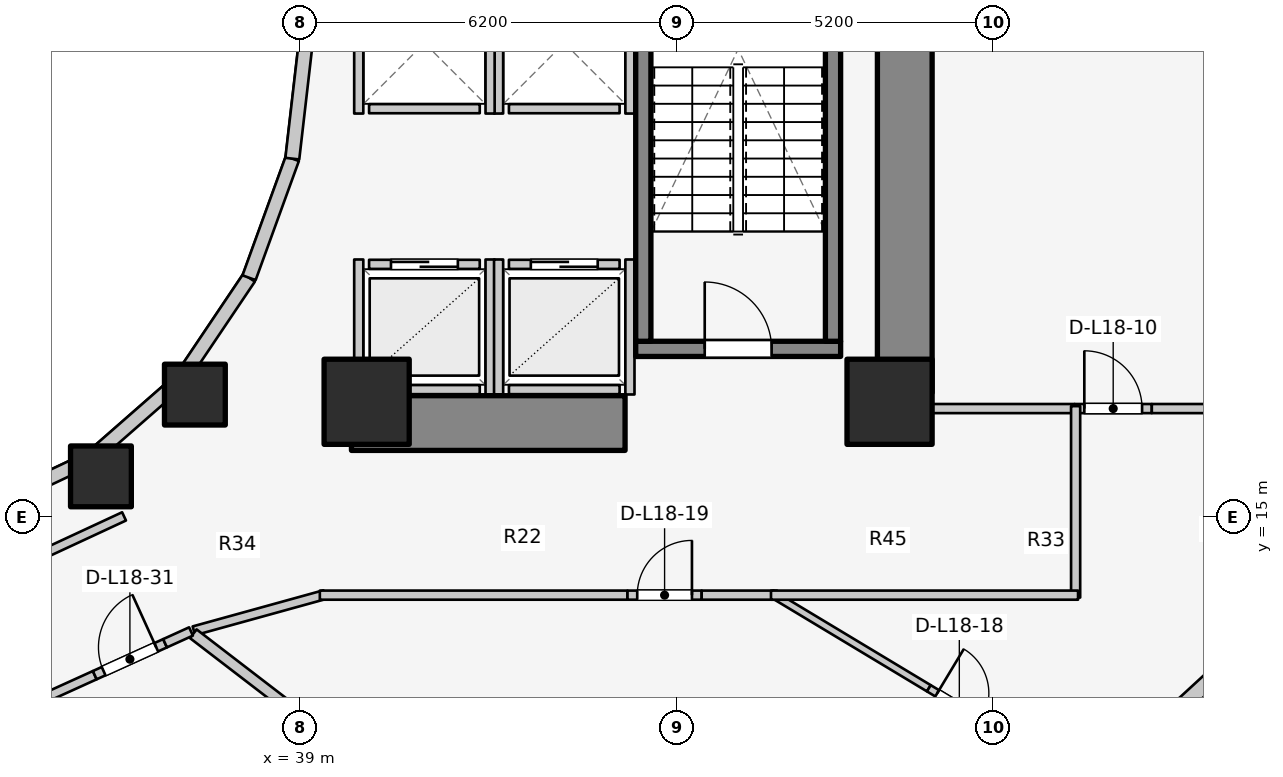
"""IFC4 building model, lengths in metres.
Left out: names, types, materials, properties, quantities, classifications, styles, units other than length and angle.
Written with IfcOpenShell. Run it as: python <this file> out.ifc"""

import sys

from ifc_helpers import new_model, si_unit, direction, frame, frame_2d, origin, origin_2d, place, context, subcontext, project, spatial, rectangle, extrude, element, fill, save


model = new_model("IFC4")
c1 = context("Model", 3, precision=1e-05, world=origin(), true_north=direction((0.0, 1.0)))
c2 = subcontext(c1, "Body", "Model", "MODEL_VIEW")
j1 = project(units=[si_unit("LENGTHUNIT", "METRE"), si_unit("PLANEANGLEUNIT", "RADIAN")], contexts=[c1])
p1 = place(None, origin())
s1 = spatial("IfcSite", under=j1, at=p1, CompositionType="ELEMENT")
p2 = place(p1, origin())
s2 = spatial("IfcBuilding", under=s1, at=p2, CompositionType="ELEMENT")
p3 = place(p2, frame((0.0, 0.0, 61.7)))
s3 = spatial("IfcBuildingStorey", under=s2, at=p3, CompositionType="ELEMENT", Elevation=61.7)
p4 = place(p3, frame((48.95, 17.05, 0.0), z_axis=(0.0, 0.0, 1.0), x_axis=(0.0, 1.0, 0.0)))
e1 = element("IfcWall", 1, at=p4, inside=s3, PredefinedType="SHEAR", context=c2, shape_type="SweptSolid", body=[
    extrude(rectangle(XDim=12.8, YDim=0.9, at=frame_2d((6.4, 0.0))), origin(), (0.0, 0.0, 1.0), 3.1),
])
p5 = place(p3, frame((39.85, 16.55, 0.0), z_axis=(0.0, 0.0, 1.0), x_axis=(1.0, 0.0, 0.0)))
e2 = element("IfcWall", 2, at=p5, inside=s3, PredefinedType="SHEAR", context=c2, shape_type="SweptSolid", body=[
    extrude(rectangle(XDim=4.5, YDim=0.9, at=frame_2d((2.25, 0.0))), origin(), (0.0, 0.0, 1.0), 3.1),
])
p6 = place(p3, frame((44.525, 17.77, 0.0), z_axis=(0.0, 0.0, 1.0), x_axis=(1.0, 0.0, 0.0)))
e3 = element("IfcWall", 3, at=p6, inside=s3, PredefinedType="SOLIDWALL", context=c2, shape_type="SweptSolid", body=[
    extrude(rectangle(XDim=3.37, YDim=0.25, at=frame_2d((1.685, 0.0))), origin(), (0.0, 0.0, 1.0), 3.1),
])
p7 = place(p6, frame((1.135, 0.0, 0.0)))
e4 = element("IfcOpeningElement", 4, at=p7, cuts=e3, PredefinedType="OPENING", context=c2, shape_type="SweptSolid", body=[
    extrude(rectangle(XDim=1.1, YDim=2.1, at=frame_2d((0.55, 1.05))), frame((0.0, 0.135, 0.0), z_axis=(0.0, -1.0, 0.0), x_axis=(1.0, 0.0, 0.0)), (0.0, 0.0, 1.0), 0.27),
])
for number, where, z_axis, x_axis in (
    (5, (44.65, 17.895, 0.0), (0.0, 0.0, 1.0), (0.0, 1.0, 0.0)),
    (6, (47.77, 17.895, 0.0), (0.0, 0.0, 1.0), (0.0, 1.0, 0.0)),
):
    element("IfcWall", number, at=place(p3, frame(where, z_axis=z_axis, x_axis=x_axis)), inside=s3, PredefinedType="SOLIDWALL", context=c2, shape_type="SweptSolid", body=[
        extrude(rectangle(XDim=7.81, YDim=0.25, at=frame_2d((3.905, 0.0))), origin(), (0.0, 0.0, 1.0), 3.1),
    ])
for number, where, z_axis, x_axis in (
    (7, (40.1, 16.9, 0.0), (0.0, 0.0, 1.0), (1.0, 0.0, 0.0)),
    (8, (48.7, 16.9, 0.0), (0.0, 0.0, 1.0), (1.0, 0.0, 0.0)),
):
    element("IfcColumn", number, at=place(p3, frame(where, z_axis=z_axis, x_axis=x_axis)), inside=s3, PredefinedType="COLUMN", context=c2, shape_type="SweptSolid", body=[
        extrude(rectangle(XDim=1.4, YDim=1.4, at=origin_2d()), origin(), (0.0, 0.0, 1.0), 3.1),
    ])
for number, where, z_axis, x_axis in (
    (9, (35.73, 15.673, 0.0), (0.0, 0.0, 1.0), (1.0, 0.0, 0.0)),
    (10, (37.275, 17.018, 0.0), (0.0, 0.0, 1.0), (1.0, 0.0, 0.0)),
):
    element("IfcColumn", number, at=place(p3, frame(where, z_axis=z_axis, x_axis=x_axis)), inside=s3, PredefinedType="COLUMN", context=c2, shape_type="SweptSolid", body=[
        extrude(rectangle(XDim=1.0, YDim=1.0, at=origin_2d()), origin(), (0.0, 0.0, 1.0), 3.1),
    ])
p8 = place(p3, frame((33.843, 15.157, 0.0), z_axis=(0.0, 0.0, 1.0), x_axis=(0.904179699603, 0.427152280606, 0.0)))
e11 = element("IfcWall", 11, at=p8, inside=s3, PredefinedType="STANDARD", context=c2, shape_type="SweptSolid", body=[
    extrude(rectangle(XDim=1.899, YDim=0.23, at=frame_2d((0.95, 0.0))), origin(), (0.0, 0.0, 1.0), 1.22),
])
p9 = place(p3, frame((35.56, 15.968, 0.0), z_axis=(0.0, 0.0, 1.0), x_axis=(0.752576694707, 0.658504607869, 0.0)))
e12 = element("IfcWall", 12, at=p9, inside=s3, PredefinedType="STANDARD", context=c2, shape_type="SweptSolid", body=[
    extrude(rectangle(XDim=1.959, YDim=0.23, at=frame_2d((0.98, 0.0))), origin(), (0.0, 0.0, 1.0), 1.22),
])
p10 = place(p3, frame((37.035, 17.258, 0.0), z_axis=(0.0, 0.0, 1.0), x_axis=(0.558197800898, 0.829707909492, 0.0)))
e13 = element("IfcWall", 13, at=p10, inside=s3, PredefinedType="STANDARD", context=c2, shape_type="SweptSolid", body=[
    extrude(rectangle(XDim=2.027, YDim=0.23, at=frame_2d((1.013, 0.0))), origin(), (0.0, 0.0, 1.0), 1.22),
])
p11 = place(p3, frame((38.166, 18.94, 0.0), z_axis=(0.0, 0.0, 1.0), x_axis=(0.341423187295, 0.93990968033, 0.0)))
e14 = element("IfcWall", 14, at=p11, inside=s3, PredefinedType="STANDARD", context=c2, shape_type="SweptSolid", body=[
    extrude(rectangle(XDim=2.084, YDim=0.23, at=frame_2d((1.042, 0.0))), origin(), (0.0, 0.0, 1.0), 2.56),
])
p12 = place(p3, frame((38.877, 20.898, 0.0), z_axis=(0.0, 0.0, 1.0), x_axis=(0.114711713601, 0.993398823617, 0.0)))
e15 = element("IfcWall", 15, at=p12, inside=s3, PredefinedType="STANDARD", context=c2, shape_type="SweptSolid", body=[
    extrude(rectangle(XDim=2.115, YDim=0.23, at=frame_2d((1.058, 0.0))), origin(), (0.0, 0.0, 1.0), 2.56),
])
p13 = place(p3, frame((50.405, 9.035, 0.0), z_axis=(0.0, 0.0, 1.0), x_axis=(0.735655109293, 0.67735630223, 0.0)))
e16 = element("IfcWall", 16, at=p13, inside=s3, PredefinedType="STANDARD", context=c2, shape_type="SweptSolid", body=[
    extrude(rectangle(XDim=5.151, YDim=0.26, at=frame_2d((2.575, 0.0))), origin(), (0.0, 0.0, 1.0), 1.22),
])
p14 = place(p13, frame((3.074, 0.0, 0.15)))
e17 = element("IfcOpeningElement", 17, at=p14, cuts=e16, PredefinedType="OPENING", context=c2, shape_type="SweptSolid", body=[
    extrude(rectangle(XDim=1.2, YDim=0.9, at=frame_2d((0.6, 0.45))), frame((0.0, 0.14, 0.0), z_axis=(0.0, -1.0, 0.0), x_axis=(1.0, 0.0, 0.0)), (0.0, 0.0, 1.0), 0.28),
])
p15 = place(p3, frame((40.14, 19.16, 0.0), z_axis=(0.0, 0.0, 1.0), x_axis=(1.0, 0.0, 0.0)))
e18 = element("IfcWall", 18, at=p15, inside=s3, PredefinedType="SOLIDWALL", context=c2, shape_type="SweptSolid", body=[
    extrude(rectangle(XDim=1.82, YDim=0.15, at=frame_2d((0.91, 0.0))), origin(), (0.0, 0.0, 1.0), 2.12),
])
p16 = place(p15, frame((0.36, 0.0, 0.0)))
e19 = element("IfcOpeningElement", 19, at=p16, cuts=e18, PredefinedType="OPENING", context=c2, shape_type="SweptSolid", body=[
    extrude(rectangle(XDim=1.1, YDim=2.1, at=frame_2d((0.55, 1.05))), frame((0.0, 0.085, 0.0), z_axis=(0.0, -1.0, 0.0), x_axis=(1.0, 0.0, 0.0)), (0.0, 0.0, 1.0), 0.17),
])
p17 = place(p3, frame((40.14, 17.1, 0.0), z_axis=(0.0, 0.0, 1.0), x_axis=(1.0, 0.0, 0.0)))
e20 = element("IfcWall", 20, at=p17, inside=s3, PredefinedType="SOLIDWALL", context=c2, shape_type="SweptSolid", body=[
    extrude(rectangle(XDim=1.82, YDim=0.15, at=frame_2d((0.91, 0.0))), origin(), (0.0, 0.0, 1.0), 2.12),
])
p18 = place(p3, frame((39.97, 17.02, 0.0), z_axis=(0.0, 0.0, 1.0), x_axis=(0.0, 1.0, 0.0)))
e21 = element("IfcWall", 21, at=p18, inside=s3, PredefinedType="SOLIDWALL", context=c2, shape_type="SweptSolid", body=[
    extrude(rectangle(XDim=2.22, YDim=0.15, at=frame_2d((1.11, 0.0))), origin(), (0.0, 0.0, 1.0), 1.873),
])
p19 = place(p3, frame((42.13, 17.02, 0.0), z_axis=(0.0, 0.0, 1.0), x_axis=(0.0, 1.0, 0.0)))
e22 = element("IfcWall", 22, at=p19, inside=s3, PredefinedType="SOLIDWALL", context=c2, shape_type="SweptSolid", body=[
    extrude(rectangle(XDim=2.22, YDim=0.15, at=frame_2d((1.11, 0.0))), origin(), (0.0, 0.0, 1.0), 2.575),
])
p20 = place(p3, frame((42.44, 19.16, 0.0), z_axis=(0.0, 0.0, 1.0), x_axis=(1.0, 0.0, 0.0)))
e23 = element("IfcWall", 23, at=p20, inside=s3, PredefinedType="SOLIDWALL", context=c2, shape_type="SweptSolid", body=[
    extrude(rectangle(XDim=1.82, YDim=0.15, at=frame_2d((0.91, 0.0))), origin(), (0.0, 0.0, 1.0), 2.575),
])
p21 = place(p20, frame((0.36, 0.0, 0.0)))
e24 = element("IfcOpeningElement", 24, at=p21, cuts=e23, PredefinedType="OPENING", context=c2, shape_type="SweptSolid", body=[
    extrude(rectangle(XDim=1.1, YDim=2.1, at=frame_2d((0.55, 1.05))), frame((0.0, 0.085, 0.0), z_axis=(0.0, -1.0, 0.0), x_axis=(1.0, 0.0, 0.0)), (0.0, 0.0, 1.0), 0.17),
])
p22 = place(p3, frame((42.44, 17.1, 0.0), z_axis=(0.0, 0.0, 1.0), x_axis=(1.0, 0.0, 0.0)))
e25 = element("IfcWall", 25, at=p22, inside=s3, PredefinedType="SOLIDWALL", context=c2, shape_type="SweptSolid", body=[
    extrude(rectangle(XDim=1.82, YDim=0.15, at=frame_2d((0.91, 0.0))), origin(), (0.0, 0.0, 1.0), 2.575),
])
p23 = place(p3, frame((42.27, 17.02, 0.0), z_axis=(0.0, 0.0, 1.0), x_axis=(0.0, 1.0, 0.0)))
e26 = element("IfcWall", 26, at=p23, inside=s3, PredefinedType="SOLIDWALL", context=c2, shape_type="SweptSolid", body=[
    extrude(rectangle(XDim=2.22, YDim=0.15, at=frame_2d((1.11, 0.0))), origin(), (0.0, 0.0, 1.0), 2.575),
])
p24 = place(p3, frame((44.43, 17.02, 0.0), z_axis=(0.0, 0.0, 1.0), x_axis=(0.0, 1.0, 0.0)))
e27 = element("IfcWall", 27, at=p24, inside=s3, PredefinedType="SOLIDWALL", context=c2, shape_type="SweptSolid", body=[
    extrude(rectangle(XDim=2.22, YDim=0.15, at=frame_2d((1.11, 0.0))), origin(), (0.0, 0.0, 1.0), 2.12),
])
p25 = place(p3, frame((42.44, 21.72, 0.0), z_axis=(0.0, 0.0, 1.0), x_axis=(1.0, 0.0, 0.0)))
e28 = element("IfcWall", 28, at=p25, inside=s3, PredefinedType="SOLIDWALL", context=c2, shape_type="SweptSolid", body=[
    extrude(rectangle(XDim=1.82, YDim=0.15, at=frame_2d((0.91, 0.0))), origin(), (0.0, 0.0, 1.0), 2.575),
])
for number, where, z_axis, x_axis in (
    (29, (42.27, 21.64, 0.0), (0.0, 0.0, 1.0), (0.0, 1.0, 0.0)),
    (30, (44.43, 21.64, 0.0), (0.0, 0.0, 1.0), (0.0, 1.0, 0.0)),
):
    element("IfcWall", number, at=place(p3, frame(where, z_axis=z_axis, x_axis=x_axis)), inside=s3, PredefinedType="SOLIDWALL", context=c2, shape_type="SweptSolid", body=[
        extrude(rectangle(XDim=2.32, YDim=0.15, at=frame_2d((1.16, 0.0))), origin(), (0.0, 0.0, 1.0), 2.575),
    ])
p26 = place(p3, frame((40.14, 21.72, 0.0), z_axis=(0.0, 0.0, 1.0), x_axis=(1.0, 0.0, 0.0)))
e31 = element("IfcWall", 31, at=p26, inside=s3, PredefinedType="SOLIDWALL", context=c2, shape_type="SweptSolid", body=[
    extrude(rectangle(XDim=1.82, YDim=0.15, at=frame_2d((0.91, 0.0))), origin(), (0.0, 0.0, 1.0), 2.12),
])
p27 = place(p3, frame((39.97, 21.64, 0.0), z_axis=(0.0, 0.0, 1.0), x_axis=(0.0, 1.0, 0.0)))
e32 = element("IfcWall", 32, at=p27, inside=s3, PredefinedType="SOLIDWALL", context=c2, shape_type="SweptSolid", body=[
    extrude(rectangle(XDim=2.32, YDim=0.15, at=frame_2d((1.16, 0.0))), origin(), (0.0, 0.0, 1.0), 2.12),
])
p28 = place(p3, frame((42.13, 21.64, 0.0), z_axis=(0.0, 0.0, 1.0), x_axis=(0.0, 1.0, 0.0)))
e33 = element("IfcWall", 33, at=p28, inside=s3, PredefinedType="SOLIDWALL", context=c2, shape_type="SweptSolid", body=[
    extrude(rectangle(XDim=2.32, YDim=0.15, at=frame_2d((1.16, 0.0))), origin(), (0.0, 0.0, 1.0), 2.575),
])
p29 = place(p3, frame((34.127, 14.094, 0.0), z_axis=(0.0, 0.0, 1.0), x_axis=(0.906943449489, 0.421252393975, 0.0)))
e34 = element("IfcWall", 34, at=p29, inside=s3, PredefinedType="PARTITIONING", context=c2, shape_type="SweptSolid", body=[
    extrude(rectangle(XDim=2.186, YDim=0.15, at=frame_2d((1.093, 0.0))), origin(), (0.0, 0.0, 1.0), 1.22),
])
p30 = place(p3, frame((48.95, 16.788, 0.0), z_axis=(0.0, 0.0, 1.0), x_axis=(1.0, 0.0, 0.0)))
e35 = element("IfcWall", 35, at=p30, inside=s3, PredefinedType="PARTITIONING", context=c2, shape_type="SweptSolid", body=[
    extrude(rectangle(XDim=2.793, YDim=0.15, at=frame_2d((1.396, 0.0))), origin(), (0.0, 0.0, 1.0), 1.22),
])
p31 = place(p3, frame((51.743, 16.788, 0.0), z_axis=(0.0, 0.0, 1.0), x_axis=(1.0, 0.0, 0.0)))
e36 = element("IfcWall", 36, at=p31, inside=s3, PredefinedType="PARTITIONING", context=c2, shape_type="SweptSolid", body=[
    extrude(rectangle(XDim=1.27, YDim=0.15, at=frame_2d((0.635, 0.0))), origin(), (0.0, 0.0, 1.0), 2.575),
])
p32 = place(p31, frame((0.16, 0.0, 0.0)))
e37 = element("IfcOpeningElement", 37, at=p32, cuts=e36, PredefinedType="OPENING", context=c2, shape_type="SweptSolid", body=[
    extrude(rectangle(XDim=0.95, YDim=2.1, at=frame_2d((0.475, 1.05))), frame((0.0, 0.085, 0.0), z_axis=(0.0, -1.0, 0.0), x_axis=(1.0, 0.0, 0.0)), (0.0, 0.0, 1.0), 0.17),
])
p33 = place(p3, frame((53.013, 16.788, 0.0), z_axis=(0.0, 0.0, 1.0), x_axis=(1.0, 0.0, 0.0)))
e38 = element("IfcWall", 38, at=p33, inside=s3, PredefinedType="PARTITIONING", context=c2, shape_type="SweptSolid", body=[
    extrude(rectangle(XDim=3.973, YDim=0.15, at=frame_2d((1.987, 0.0))), origin(), (0.0, 0.0, 1.0), 2.575),
])
p34 = place(p3, frame((51.76, 13.68, 0.0), z_axis=(0.0, 0.0, 1.0), x_axis=(0.0, 1.0, 0.0)))
e39 = element("IfcWall", 39, at=p34, inside=s3, PredefinedType="PARTITIONING", context=c2, shape_type="SweptSolid", body=[
    extrude(rectangle(XDim=3.148, YDim=0.15, at=frame_2d((1.574, 0.0))), origin(), (0.0, 0.0, 1.0), 2.575),
])
p35 = place(p3, frame((46.757, 13.746, 0.0), z_axis=(0.0, 0.0, 1.0), x_axis=(0.85690055002, -0.515481762408, 0.0)))
e40 = element("IfcWall", 40, at=p35, inside=s3, PredefinedType="MOVABLE", context=c2, shape_type="SweptSolid", body=[
    extrude(rectangle(XDim=3.021, YDim=0.12, at=frame_2d((1.511, 0.0))), origin(), (0.0, 0.0, 1.0), 1.22),
])
p36 = place(p3, frame((49.346, 12.188, 0.0), z_axis=(0.0, 0.0, 1.0), x_axis=(0.856958544896, -0.515385343534, 0.0)))
e41 = element("IfcWall", 41, at=p36, inside=s3, PredefinedType="MOVABLE", context=c2, shape_type="SweptSolid", body=[
    extrude(rectangle(XDim=1.17, YDim=0.12, at=frame_2d((0.585, 0.0))), origin(), (0.0, 0.0, 1.0), 2.11),
])
p37 = place(p36, frame((0.16, 0.0, 0.0)))
e42 = element("IfcOpeningElement", 42, at=p37, cuts=e41, PredefinedType="OPENING", context=c2, shape_type="SweptSolid", body=[
    extrude(rectangle(XDim=0.85, YDim=2.05, at=frame_2d((0.425, 1.025))), frame((0.0, 0.07, 0.0), z_axis=(0.0, -1.0, 0.0), x_axis=(1.0, 0.0, 0.0)), (0.0, 0.0, 1.0), 0.14),
])
p38 = place(p3, frame((37.258, 13.133, 0.0), z_axis=(0.0, 0.0, 1.0), x_axis=(0.963833843713, 0.266503886865, 0.0)))
e43 = element("IfcWall", 43, at=p38, inside=s3, PredefinedType="PARTITIONING", context=c2, shape_type="SweptSolid", body=[
    extrude(rectangle(XDim=2.232, YDim=0.15, at=frame_2d((1.116, 0.0))), origin(), (0.0, 0.0, 1.0), 1.22),
])
p39 = place(p3, frame((39.33, 13.72, 0.0), z_axis=(0.0, 0.0, 1.0), x_axis=(1.0, 0.0, 0.0)))
e44 = element("IfcWall", 44, at=p39, inside=s3, PredefinedType="PARTITIONING", context=c2, shape_type="SweptSolid", body=[
    extrude(rectangle(XDim=5.06, YDim=0.15, at=frame_2d((2.53, 0.0))), origin(), (0.0, 0.0, 1.0), 1.22),
])
p40 = place(p3, frame((44.39, 13.72, 0.0), z_axis=(0.0, 0.0, 1.0), x_axis=(1.0, 0.0, 0.0)))
e45 = element("IfcWall", 45, at=p40, inside=s3, PredefinedType="PARTITIONING", context=c2, shape_type="SweptSolid", body=[
    extrude(rectangle(XDim=1.22, YDim=0.15, at=frame_2d((0.61, 0.0))), origin(), (0.0, 0.0, 1.0), 2.575),
])
p41 = place(p40, frame((0.16, 0.0, 0.0)))
e46 = element("IfcOpeningElement", 46, at=p41, cuts=e45, PredefinedType="OPENING", context=c2, shape_type="SweptSolid", body=[
    extrude(rectangle(XDim=0.9, YDim=2.1, at=frame_2d((0.45, 1.05))), frame((0.0, 0.085, 0.0), z_axis=(0.0, -1.0, 0.0), x_axis=(1.0, 0.0, 0.0)), (0.0, 0.0, 1.0), 0.17),
])
p42 = place(p3, frame((45.61, 13.72, 0.0), z_axis=(0.0, 0.0, 1.0), x_axis=(1.0, 0.0, 0.0)))
e47 = element("IfcWall", 47, at=p42, inside=s3, PredefinedType="PARTITIONING", context=c2, shape_type="SweptSolid", body=[
    extrude(rectangle(XDim=1.24, YDim=0.15, at=frame_2d((0.62, 0.0))), origin(), (0.0, 0.0, 1.0), 2.575),
])
p43 = place(p3, frame((46.75, 13.72, 0.0), z_axis=(0.0, 0.0, 1.0), x_axis=(1.0, 0.0, 0.0)))
e48 = element("IfcWall", 48, at=p43, inside=s3, PredefinedType="PARTITIONING", context=c2, shape_type="SweptSolid", body=[
    extrude(rectangle(XDim=5.05, YDim=0.15, at=frame_2d((2.525, 0.0))), origin(), (0.0, 0.0, 1.0), 1.22),
])
p44 = place(p3, frame((37.249, 13.085, 0.0), z_axis=(0.0, 0.0, 1.0), x_axis=(0.793181014702, -0.608985942298, 0.0)))
e49 = element("IfcWall", 49, at=p44, inside=s3, PredefinedType="PARTITIONING", context=c2, shape_type="SweptSolid", body=[
    extrude(rectangle(XDim=10.324, YDim=0.18, at=frame_2d((5.162, 0.0))), origin(), (0.0, 0.0, 1.0), 1.22),
])
p45 = place(p3, frame((34.665, 12.02, 0.0), z_axis=(0.0, 0.0, 1.0), x_axis=(0.577139575342, -0.816645523207, 0.0)))
e50 = element("IfcWall", 50, at=p45, inside=s3, PredefinedType="PLUMBINGWALL", context=c2, shape_type="SweptSolid", body=[
    extrude(rectangle(XDim=2.1, YDim=0.14, at=frame_2d((1.05, 0.0))), origin(), (0.0, 0.0, 1.0), 2.575),
])
p46 = place(p3, frame((34.687, 11.977, 0.0), z_axis=(0.0, 0.0, 1.0), x_axis=(0.910657491524, 0.413162114831, 0.0)))
e51 = element("IfcWall", 51, at=p46, inside=s3, PredefinedType="PARTITIONING", context=c2, shape_type="SweptSolid", body=[
    extrude(rectangle(XDim=1.033, YDim=0.15, at=frame_2d((0.517, 0.0))), origin(), (0.0, 0.0, 1.0), 1.22),
])
p47 = place(p3, frame((35.628, 12.404, 0.0), z_axis=(0.0, 0.0, 1.0), x_axis=(0.910491529429, 0.413527719553, 0.0)))
e52 = element("IfcWall", 52, at=p47, inside=s3, PredefinedType="PARTITIONING", context=c2, shape_type="SweptSolid", body=[
    extrude(rectangle(XDim=1.27, YDim=0.15, at=frame_2d((0.635, 0.0))), origin(), (0.0, 0.0, 1.0), 2.16),
])
p48 = place(p47, frame((0.16, 0.0, 0.0)))
e53 = element("IfcOpeningElement", 53, at=p48, cuts=e52, PredefinedType="OPENING", context=c2, shape_type="SweptSolid", body=[
    extrude(rectangle(XDim=0.95, YDim=2.1, at=frame_2d((0.475, 1.05))), frame((0.0, 0.085, 0.0), z_axis=(0.0, -1.0, 0.0), x_axis=(1.0, 0.0, 0.0)), (0.0, 0.0, 1.0), 0.17),
])
p49 = place(p3, frame((36.785, 12.929, 0.0), z_axis=(0.0, 0.0, 1.0), x_axis=(0.910580557663, 0.413331644091, 0.0)))
e54 = element("IfcWall", 54, at=p49, inside=s3, PredefinedType="PARTITIONING", context=c2, shape_type="SweptSolid", body=[
    extrude(rectangle(XDim=0.469, YDim=0.15, at=frame_2d((0.234, 0.0))), origin(), (0.0, 0.0, 1.0), 2.575),
])
p50 = place(p7, origin())
e55 = element("IfcDoor", 55, at=p50, inside=s3, OperationType="SINGLE_SWING_LEFT", PredefinedType="DOOR", context=c2, shape_type="SweptSolid", body=[
    extrude(rectangle(XDim=1.1, YDim=2.1, at=frame_2d((0.55, 1.05))), frame((0.0, 0.025, 0.0), z_axis=(0.0, -1.0, 0.0), x_axis=(1.0, 0.0, 0.0)), (0.0, 0.0, 1.0), 0.05),
])
fill(e4, e55)
p51 = place(p16, origin())
e56 = element("IfcDoor", 56, at=p51, inside=s3, OperationType="DOUBLE_DOOR_SLIDING", PredefinedType="DOOR", context=c2, shape_type="SweptSolid", body=[
    extrude(rectangle(XDim=1.1, YDim=2.1, at=frame_2d((0.55, 1.05))), frame((0.0, 0.025, 0.0), z_axis=(0.0, -1.0, 0.0), x_axis=(1.0, 0.0, 0.0)), (0.0, 0.0, 1.0), 0.05),
])
fill(e19, e56)
p52 = place(p21, origin())
e57 = element("IfcDoor", 57, at=p52, inside=s3, OperationType="DOUBLE_DOOR_SLIDING", PredefinedType="DOOR", context=c2, shape_type="SweptSolid", body=[
    extrude(rectangle(XDim=1.1, YDim=2.1, at=frame_2d((0.55, 1.05))), frame((0.0, 0.025, 0.0), z_axis=(0.0, -1.0, 0.0), x_axis=(1.0, 0.0, 0.0)), (0.0, 0.0, 1.0), 0.05),
])
fill(e24, e57)
p53 = place(p32, origin())
e58 = element("IfcDoor", 58, at=p53, inside=s3, OperationType="SINGLE_SWING_LEFT", PredefinedType="DOOR", context=c2, shape_type="SweptSolid", body=[
    extrude(rectangle(XDim=0.95, YDim=2.1, at=frame_2d((0.475, 1.05))), frame((0.0, 0.025, 0.0), z_axis=(0.0, -1.0, 0.0), x_axis=(1.0, 0.0, 0.0)), (0.0, 0.0, 1.0), 0.05),
])
fill(e37, e58)
p54 = place(p37, origin())
e59 = element("IfcDoor", 59, at=p54, inside=s3, OperationType="SINGLE_SWING_LEFT", PredefinedType="DOOR", context=c2, shape_type="SweptSolid", body=[
    extrude(rectangle(XDim=0.85, YDim=2.05, at=frame_2d((0.425, 1.025))), frame((0.0, 0.025, 0.0), z_axis=(0.0, -1.0, 0.0), x_axis=(1.0, 0.0, 0.0)), (0.0, 0.0, 1.0), 0.05),
])
fill(e42, e59)
p55 = place(p41, origin())
e60 = element("IfcDoor", 60, at=p55, inside=s3, OperationType="SINGLE_SWING_RIGHT", PredefinedType="DOOR", context=c2, shape_type="SweptSolid", body=[
    extrude(rectangle(XDim=0.9, YDim=2.1, at=frame_2d((0.45, 1.05))), frame((0.0, 0.025, 0.0), z_axis=(0.0, -1.0, 0.0), x_axis=(1.0, 0.0, 0.0)), (0.0, 0.0, 1.0), 0.05),
])
fill(e46, e60)
p56 = place(p48, origin())
e61 = element("IfcDoor", 61, at=p56, inside=s3, OperationType="SINGLE_SWING_RIGHT", PredefinedType="DOOR", context=c2, shape_type="SweptSolid", body=[
    extrude(rectangle(XDim=0.95, YDim=2.1, at=frame_2d((0.475, 1.05))), frame((0.0, 0.025, 0.0), z_axis=(0.0, -1.0, 0.0), x_axis=(1.0, 0.0, 0.0)), (0.0, 0.0, 1.0), 0.05),
])
fill(e53, e61)
save(model, sys.argv[1])
